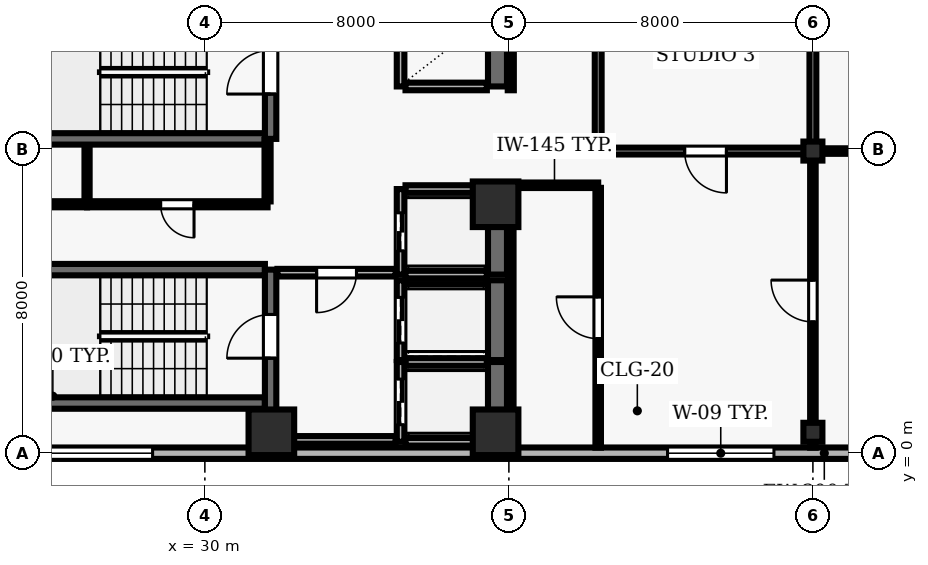
"""IFC4 building model, lengths in metres.
Left out: names, types, materials, properties, quantities, classifications, styles, units other than length and angle.
Written with IfcOpenShell. Run it as: python <this file> out.ifc"""

import sys

from ifc_helpers import new_model, si_unit, direction, frame, frame_2d, origin, origin_2d, place, context, subcontext, project, spatial, rectangle, hollow_rectangle, extrude, element, fill, save


model = new_model("IFC4")
c1 = context("Model", 3, precision=1e-05, world=origin(), true_north=direction((0.0, 1.0)))
c2 = subcontext(c1, "Body", "Model", "MODEL_VIEW")
j1 = project(units=[si_unit("LENGTHUNIT", "METRE"), si_unit("PLANEANGLEUNIT", "RADIAN")], contexts=[c1])
p1 = place(None, origin())
s1 = spatial("IfcSite", under=j1, at=p1, CompositionType="ELEMENT")
p2 = place(p1, origin())
s2 = spatial("IfcBuilding", under=s1, at=p2, CompositionType="ELEMENT")
p3 = place(p2, frame((0.0, 0.0, 134.6)))
s3 = spatial("IfcBuildingStorey", under=s2, at=p3, CompositionType="ELEMENT", Elevation=134.6)
for number, where, z_axis, x_axis in (
    (1, (31.75, 0.55, 0.0), (0.0, 0.0, 1.0), (1.0, 0.0, 0.0)),
    (2, (37.65, 0.55, 0.0), (0.0, 0.0, 1.0), (1.0, 0.0, 0.0)),
    (3, (37.65, 6.55, 0.0), (0.0, 0.0, 1.0), (1.0, 0.0, 0.0)),
):
    element("IfcColumn", number, at=place(p3, frame(where, z_axis=z_axis, x_axis=x_axis)), inside=s3, PredefinedType="COLUMN", context=c2, shape_type="SweptSolid", body=[
        extrude(rectangle(XDim=1.2, YDim=1.2, at=origin_2d()), origin(), (0.0, 0.0, 1.0), 3.9),
    ])
for number, where, z_axis, x_axis in (
    (4, (46.0, 0.55, 0.0), (0.0, 0.0, 1.0), (1.0, 0.0, 0.0)),
    (5, (46.0, 7.95, 0.0), (0.0, 0.0, 1.0), (1.0, 0.0, 0.0)),
):
    element("IfcColumn", number, at=place(p3, frame(where, z_axis=z_axis, x_axis=x_axis)), inside=s3, PredefinedType="COLUMN", context=c2, shape_type="SweptSolid", body=[
        extrude(hollow_rectangle(XDim=0.5, YDim=0.5, WallThickness=0.025, at=origin_2d()), origin(), (0.0, 0.0, 1.0), 3.9),
    ])
p4 = place(p3, frame((24.5, 0.0, 0.0), z_axis=(0.0, 0.0, 1.0), x_axis=(1.0, 0.0, 0.0)))
e6 = element("IfcWall", 6, at=p4, inside=s3, PredefinedType="SOLIDWALL", context=c2, shape_type="SweptSolid", body=[
    extrude(rectangle(XDim=43.6, YDim=0.3, at=frame_2d((21.8, 0.0))), origin(), (0.0, 0.0, 1.0), 3.69),
])
p5 = place(p4, frame((1.325, 0.0, 0.9)))
e7 = element("IfcOpeningElement", 7, at=p5, cuts=e6, PredefinedType="OPENING", context=c2, shape_type="SweptSolid", body=[
    extrude(rectangle(XDim=2.8, YDim=1.8, at=frame_2d((1.4, 0.9))), frame((0.0, 0.16, 0.0), z_axis=(0.0, -1.0, 0.0), x_axis=(1.0, 0.0, 0.0)), (0.0, 0.0, 1.0), 0.32),
])
p6 = place(p4, frame((17.675, 0.0, 0.9)))
e8 = element("IfcOpeningElement", 8, at=p6, cuts=e6, PredefinedType="OPENING", context=c2, shape_type="SweptSolid", body=[
    extrude(rectangle(XDim=2.8, YDim=1.8, at=frame_2d((1.4, 0.9))), frame((0.0, 0.16, 0.0), z_axis=(0.0, -1.0, 0.0), x_axis=(1.0, 0.0, 0.0)), (0.0, 0.0, 1.0), 0.32),
])
p7 = place(p4, frame((23.125, 0.0, 0.9)))
e9 = element("IfcOpeningElement", 9, at=p7, cuts=e6, PredefinedType="OPENING", context=c2, shape_type="SweptSolid", body=[
    extrude(rectangle(XDim=2.8, YDim=1.8, at=frame_2d((1.4, 0.9))), frame((0.0, 0.16, 0.0), z_axis=(0.0, -1.0, 0.0), x_axis=(1.0, 0.0, 0.0)), (0.0, 0.0, 1.0), 0.32),
])
p8 = place(p4, frame((29.475, 0.0, 0.9)))
e10 = element("IfcOpeningElement", 10, at=p8, cuts=e6, PredefinedType="OPENING", context=c2, shape_type="SweptSolid", body=[
    extrude(rectangle(XDim=2.8, YDim=1.8, at=frame_2d((1.4, 0.9))), frame((0.0, 0.16, 0.0), z_axis=(0.0, -1.0, 0.0), x_axis=(1.0, 0.0, 0.0)), (0.0, 0.0, 1.0), 0.32),
])
for number, where, z_axis, x_axis in (
    (11, (31.58, 4.83, 0.0), (0.0, 0.0, 1.0), (-1.0, 0.0, 0.0)),
    (12, (23.22, 1.32, 0.0), (0.0, 0.0, 1.0), (1.0, 0.0, 0.0)),
):
    element("IfcWall", number, at=place(p3, frame(where, z_axis=z_axis, x_axis=x_axis)), inside=s3, PredefinedType="SHEAR", context=c2, shape_type="SweptSolid", body=[
        extrude(rectangle(XDim=8.36, YDim=0.3, at=frame_2d((4.18, 0.0))), origin(), (0.0, 0.0, 1.0), 3.69),
    ])
p9 = place(p3, frame((31.73, 0.96, 0.0), z_axis=(0.0, 0.0, 1.0), x_axis=(0.0, 1.0, 0.0)))
e13 = element("IfcWall", 13, at=p9, inside=s3, PredefinedType="SHEAR", context=c2, shape_type="SweptSolid", body=[
    extrude(rectangle(XDim=3.87, YDim=0.3, at=frame_2d((1.935, 0.0))), origin(), (0.0, 0.0, 1.0), 3.69),
])
p10 = place(p9, frame((1.54, 0.0, 0.0)))
e14 = element("IfcOpeningElement", 14, at=p10, cuts=e13, PredefinedType="OPENING", context=c2, shape_type="SweptSolid", body=[
    extrude(rectangle(XDim=1.15, YDim=2.15, at=frame_2d((0.575, 1.075))), frame((0.0, 0.16, 0.0), z_axis=(0.0, -1.0, 0.0), x_axis=(1.0, 0.0, 0.0)), (0.0, 0.0, 1.0), 0.32),
])
p11 = place(p3, frame((23.22, 8.27, 0.0), z_axis=(0.0, 0.0, 1.0), x_axis=(1.0, 0.0, 0.0)))
e15 = element("IfcWall", 15, at=p11, inside=s3, PredefinedType="SHEAR", context=c2, shape_type="SweptSolid", body=[
    extrude(rectangle(XDim=8.36, YDim=0.3, at=frame_2d((4.18, 0.0))), origin(), (0.0, 0.0, 1.0), 3.69),
])
p12 = place(p3, frame((31.73, 8.27, 0.0), z_axis=(0.0, 0.0, 1.0), x_axis=(0.0, 1.0, 0.0)))
e16 = element("IfcWall", 16, at=p12, inside=s3, PredefinedType="SHEAR", context=c2, shape_type="SweptSolid", body=[
    extrude(rectangle(XDim=3.51, YDim=0.3, at=frame_2d((1.755, 0.0))), origin(), (0.0, 0.0, 1.0), 3.69),
])
p13 = place(p12, frame((1.18, 0.0, 0.0)))
e17 = element("IfcOpeningElement", 17, at=p13, cuts=e16, PredefinedType="OPENING", context=c2, shape_type="SweptSolid", body=[
    extrude(rectangle(XDim=1.15, YDim=2.15, at=frame_2d((0.575, 1.075))), frame((0.0, 0.16, 0.0), z_axis=(0.0, -1.0, 0.0), x_axis=(1.0, 0.0, 0.0)), (0.0, 0.0, 1.0), 0.32),
])
p14 = place(p3, frame((35.15, 2.4, 0.0), z_axis=(0.0, 0.0, 1.0), x_axis=(0.0, -1.0, 0.0)))
e18 = element("IfcWall", 18, at=p14, inside=s3, PredefinedType="SOLIDWALL", context=c2, shape_type="SweptSolid", body=[
    extrude(rectangle(XDim=2.1, YDim=0.2, at=frame_2d((1.05, 0.0))), origin(), (0.0, 0.0, 1.0), 3.69),
])
p15 = place(p14, frame((0.45, 0.0, 0.0)))
e19 = element("IfcOpeningElement", 19, at=p15, cuts=e18, PredefinedType="OPENING", context=c2, shape_type="SweptSolid", body=[
    extrude(rectangle(XDim=1.2, YDim=2.15, at=frame_2d((0.6, 1.075))), frame((0.0, 0.11, 0.0), z_axis=(0.0, -1.0, 0.0), x_axis=(1.0, 0.0, 0.0)), (0.0, 0.0, 1.0), 0.22),
])
p16 = place(p3, frame((37.7, 0.3, 0.0), z_axis=(0.0, 0.0, 1.0), x_axis=(0.0, 1.0, 0.0)))
e20 = element("IfcWall", 20, at=p16, inside=s3, PredefinedType="SHEAR", context=c2, shape_type="SweptSolid", body=[
    extrude(rectangle(XDim=2.1, YDim=0.5, at=frame_2d((1.05, 0.0))), origin(), (0.0, 0.0, 1.0), 3.69),
])
for number, where, z_axis, x_axis in (
    (21, (35.28, 0.3, 0.0), (0.0, 0.0, 1.0), (1.0, 0.0, 0.0)),
    (22, (37.42, 2.4, 0.0), (0.0, 0.0, 1.0), (-1.0, 0.0, 0.0)),
):
    element("IfcWall", number, at=place(p3, frame(where, z_axis=z_axis, x_axis=x_axis)), inside=s3, PredefinedType="SOLIDWALL", context=c2, shape_type="SweptSolid", body=[
        extrude(rectangle(XDim=2.14, YDim=0.2, at=frame_2d((1.07, 0.0))), origin(), (0.0, 0.0, 1.0), 3.69),
    ])
p17 = place(p3, frame((35.15, 4.55, 0.0), z_axis=(0.0, 0.0, 1.0), x_axis=(0.0, -1.0, 0.0)))
e23 = element("IfcWall", 23, at=p17, inside=s3, PredefinedType="SOLIDWALL", context=c2, shape_type="SweptSolid", body=[
    extrude(rectangle(XDim=2.1, YDim=0.2, at=frame_2d((1.05, 0.0))), origin(), (0.0, 0.0, 1.0), 3.69),
])
p18 = place(p17, frame((0.45, 0.0, 0.0)))
e24 = element("IfcOpeningElement", 24, at=p18, cuts=e23, PredefinedType="OPENING", context=c2, shape_type="SweptSolid", body=[
    extrude(rectangle(XDim=1.2, YDim=2.15, at=frame_2d((0.6, 1.075))), frame((0.0, 0.11, 0.0), z_axis=(0.0, -1.0, 0.0), x_axis=(1.0, 0.0, 0.0)), (0.0, 0.0, 1.0), 0.22),
])
p19 = place(p3, frame((37.7, 2.45, 0.0), z_axis=(0.0, 0.0, 1.0), x_axis=(0.0, 1.0, 0.0)))
e25 = element("IfcWall", 25, at=p19, inside=s3, PredefinedType="SHEAR", context=c2, shape_type="SweptSolid", body=[
    extrude(rectangle(XDim=2.1, YDim=0.5, at=frame_2d((1.05, 0.0))), origin(), (0.0, 0.0, 1.0), 3.69),
])
p20 = place(p3, frame((37.42, 4.55, 0.0), z_axis=(0.0, 0.0, 1.0), x_axis=(-1.0, 0.0, 0.0)))
e26 = element("IfcWall", 26, at=p20, inside=s3, PredefinedType="SOLIDWALL", context=c2, shape_type="SweptSolid", body=[
    extrude(rectangle(XDim=2.14, YDim=0.2, at=frame_2d((1.07, 0.0))), origin(), (0.0, 0.0, 1.0), 3.69),
])
p21 = place(p3, frame((35.15, 6.95, 0.0), z_axis=(0.0, 0.0, 1.0), x_axis=(0.0, -1.0, 0.0)))
e27 = element("IfcWall", 27, at=p21, inside=s3, PredefinedType="SOLIDWALL", context=c2, shape_type="SweptSolid", body=[
    extrude(rectangle(XDim=2.25, YDim=0.2, at=frame_2d((1.125, 0.0))), origin(), (0.0, 0.0, 1.0), 3.69),
])
p22 = place(p21, frame((0.625, 0.0, 0.0)))
e28 = element("IfcOpeningElement", 28, at=p22, cuts=e27, PredefinedType="OPENING", context=c2, shape_type="SweptSolid", body=[
    extrude(rectangle(XDim=1.0, YDim=2.1, at=frame_2d((0.5, 1.05))), frame((0.0, 0.11, 0.0), z_axis=(0.0, -1.0, 0.0), x_axis=(1.0, 0.0, 0.0)), (0.0, 0.0, 1.0), 0.22),
])
p23 = place(p3, frame((37.7, 4.7, 0.0), z_axis=(0.0, 0.0, 1.0), x_axis=(0.0, 1.0, 0.0)))
e29 = element("IfcWall", 29, at=p23, inside=s3, PredefinedType="SHEAR", context=c2, shape_type="SweptSolid", body=[
    extrude(rectangle(XDim=2.25, YDim=0.5, at=frame_2d((1.125, 0.0))), origin(), (0.0, 0.0, 1.0), 3.69),
])
for number, where, z_axis, x_axis in (
    (30, (35.28, 4.7, 0.0), (0.0, 0.0, 1.0), (1.0, 0.0, 0.0)),
    (31, (37.42, 6.95, 0.0), (0.0, 0.0, 1.0), (-1.0, 0.0, 0.0)),
):
    element("IfcWall", number, at=place(p3, frame(where, z_axis=z_axis, x_axis=x_axis)), inside=s3, PredefinedType="SOLIDWALL", context=c2, shape_type="SweptSolid", body=[
        extrude(rectangle(XDim=2.14, YDim=0.2, at=frame_2d((1.07, 0.0))), origin(), (0.0, 0.0, 1.0), 3.69),
    ])
p24 = place(p3, frame((35.15, 11.55, 0.0), z_axis=(0.0, 0.0, 1.0), x_axis=(0.0, -1.0, 0.0)))
e32 = element("IfcWall", 32, at=p24, inside=s3, PredefinedType="SOLIDWALL", context=c2, shape_type="SweptSolid", body=[
    extrude(rectangle(XDim=1.9, YDim=0.2, at=frame_2d((0.95, 0.0))), origin(), (0.0, 0.0, 1.0), 3.69),
])
p25 = place(p3, frame((37.7, 9.65, 0.0), z_axis=(0.0, 0.0, 1.0), x_axis=(0.0, 1.0, 0.0)))
e33 = element("IfcWall", 33, at=p25, inside=s3, PredefinedType="SHEAR", context=c2, shape_type="SweptSolid", body=[
    extrude(rectangle(XDim=1.9, YDim=0.5, at=frame_2d((0.95, 0.0))), origin(), (0.0, 0.0, 1.0), 3.69),
])
p26 = place(p3, frame((35.28, 9.65, 0.0), z_axis=(0.0, 0.0, 1.0), x_axis=(1.0, 0.0, 0.0)))
e34 = element("IfcWall", 34, at=p26, inside=s3, PredefinedType="SOLIDWALL", context=c2, shape_type="SweptSolid", body=[
    extrude(rectangle(XDim=2.14, YDim=0.2, at=frame_2d((1.07, 0.0))), origin(), (0.0, 0.0, 1.0), 3.69),
])
p27 = place(p3, frame((26.9, 6.55, 0.0), z_axis=(0.0, 0.0, 1.0), x_axis=(-1.0, 0.0, 0.0)))
e35 = element("IfcWall", 35, at=p27, inside=s3, PredefinedType="PARTITIONING", context=c2, shape_type="SweptSolid", body=[
    extrude(rectangle(XDim=4.7, YDim=0.16, at=frame_2d((2.35, 0.0))), origin(), (0.0, 0.0, 1.0), 3.69),
])
p28 = place(p27, frame((1.91, 0.0, 0.0)))
e36 = element("IfcOpeningElement", 36, at=p28, cuts=e35, PredefinedType="OPENING", context=c2, shape_type="SweptSolid", body=[
    extrude(rectangle(XDim=0.88, YDim=2.1, at=frame_2d((0.44, 1.05))), frame((0.0, 0.09, 0.0), z_axis=(0.0, -1.0, 0.0), x_axis=(1.0, 0.0, 0.0)), (0.0, 0.0, 1.0), 0.18),
])
p29 = place(p3, frame((31.65, 0.35, 0.0), z_axis=(0.0, 0.0, 1.0), x_axis=(1.0, 0.0, 0.0)))
e37 = element("IfcWall", 37, at=p29, inside=s3, PredefinedType="SOLIDWALL", context=c2, shape_type="SweptSolid", body=[
    extrude(rectangle(XDim=3.37, YDim=0.2, at=frame_2d((1.685, 0.0))), origin(), (0.0, 0.0, 1.0), 3.69),
])
p30 = place(p3, frame((31.65, 6.55, 0.0), z_axis=(0.0, 0.0, 1.0), x_axis=(-1.0, 0.0, 0.0)))
e38 = element("IfcWall", 38, at=p30, inside=s3, PredefinedType="PARTITIONING", context=c2, shape_type="SweptSolid", body=[
    extrude(rectangle(XDim=4.75, YDim=0.16, at=frame_2d((2.375, 0.0))), origin(), (0.0, 0.0, 1.0), 3.69),
])
p31 = place(p30, frame((1.935, 0.0, 0.0)))
e39 = element("IfcOpeningElement", 39, at=p31, cuts=e38, PredefinedType="OPENING", context=c2, shape_type="SweptSolid", body=[
    extrude(rectangle(XDim=0.88, YDim=2.1, at=frame_2d((0.44, 1.05))), frame((0.0, 0.09, 0.0), z_axis=(0.0, -1.0, 0.0), x_axis=(1.0, 0.0, 0.0)), (0.0, 0.0, 1.0), 0.18),
])
p32 = place(p3, frame((35.02, 4.75, 0.0), z_axis=(0.0, 0.0, 1.0), x_axis=(-1.0, 0.0, 0.0)))
e40 = element("IfcWall", 40, at=p32, inside=s3, PredefinedType="SOLIDWALL", context=c2, shape_type="SweptSolid", body=[
    extrude(rectangle(XDim=3.11, YDim=0.2, at=frame_2d((1.555, 0.0))), origin(), (0.0, 0.0, 1.0), 3.69),
])
p33 = place(p32, frame((1.03, 0.0, 0.0)))
e41 = element("IfcOpeningElement", 41, at=p33, cuts=e40, PredefinedType="OPENING", context=c2, shape_type="SweptSolid", body=[
    extrude(rectangle(XDim=1.05, YDim=2.15, at=frame_2d((0.525, 1.075))), frame((0.0, 0.11, 0.0), z_axis=(0.0, -1.0, 0.0), x_axis=(1.0, 0.0, 0.0)), (0.0, 0.0, 1.0), 0.22),
])
p34 = place(p3, frame((38.05, 7.05, 0.0), z_axis=(0.0, 0.0, 1.0), x_axis=(1.0, 0.0, 0.0)))
e42 = element("IfcWall", 42, at=p34, inside=s3, PredefinedType="PARTITIONING", context=c2, shape_type="SweptSolid", body=[
    extrude(rectangle(XDim=2.3, YDim=0.145, at=frame_2d((1.15, 0.0))), origin(), (0.0, 0.0, 1.0), 3.69),
])
p35 = place(p3, frame((46.0, 7.95, 0.0), z_axis=(0.0, 0.0, 1.0), x_axis=(-1.0, 0.0, 0.0)))
e43 = element("IfcWall", 43, at=p35, inside=s3, PredefinedType="PARTITIONING", context=c2, shape_type="SweptSolid", body=[
    extrude(rectangle(XDim=5.65, YDim=0.18, at=frame_2d((2.825, 0.0))), origin(), (0.0, 0.0, 1.0), 3.074),
])
p36 = place(p35, frame((2.275, 0.0, 0.0)))
e44 = element("IfcOpeningElement", 44, at=p36, cuts=e43, PredefinedType="OPENING", context=c2, shape_type="SweptSolid", body=[
    extrude(rectangle(XDim=1.1, YDim=2.15, at=frame_2d((0.55, 1.075))), frame((0.0, 0.1, 0.0), z_axis=(0.0, -1.0, 0.0), x_axis=(1.0, 0.0, 0.0)), (0.0, 0.0, 1.0), 0.2),
])
p37 = place(p3, frame((53.05, 7.95, 0.0), z_axis=(0.0, 0.0, 1.0), x_axis=(-1.0, 0.0, 0.0)))
e45 = element("IfcWall", 45, at=p37, inside=s3, PredefinedType="PARTITIONING", context=c2, shape_type="SweptSolid", body=[
    extrude(rectangle(XDim=7.05, YDim=0.145, at=frame_2d((3.525, 0.0))), origin(), (0.0, 0.0, 1.0), 3.074),
])
p38 = place(p3, frame((26.9, 6.625, 0.0), z_axis=(0.0, 0.0, 1.0), x_axis=(0.0, 1.0, 0.0)))
e46 = element("IfcWall", 46, at=p38, inside=s3, PredefinedType="PARTITIONING", context=c2, shape_type="SweptSolid", body=[
    extrude(rectangle(XDim=1.465, YDim=0.135, at=frame_2d((0.732, 0.0))), origin(), (0.0, 0.0, 1.0), 3.69),
])
p39 = place(p3, frame((31.65, 8.24, 0.0), z_axis=(0.0, 0.0, 1.0), x_axis=(0.0, -1.0, 0.0)))
e47 = element("IfcWall", 47, at=p39, inside=s3, PredefinedType="PARTITIONING", context=c2, shape_type="SweptSolid", body=[
    extrude(rectangle(XDim=1.615, YDim=0.16, at=frame_2d((0.808, 0.0))), origin(), (0.0, 0.0, 1.0), 3.69),
])
p40 = place(p3, frame((38.05, 6.982, 0.0), z_axis=(0.0, 0.0, 1.0), x_axis=(0.0, -1.0, 0.0)))
e48 = element("IfcWall", 48, at=p40, inside=s3, PredefinedType="PARTITIONING", context=c2, shape_type="SweptSolid", body=[
    extrude(rectangle(XDim=6.837, YDim=0.145, at=frame_2d((3.418, 0.0))), origin(), (0.0, 0.0, 1.0), 3.074),
])
p41 = place(p3, frame((38.05, 15.925, 0.0), z_axis=(0.0, 0.0, 1.0), x_axis=(0.0, -1.0, 0.0)))
e49 = element("IfcWall", 49, at=p41, inside=s3, PredefinedType="PARTITIONING", context=c2, shape_type="SweptSolid", body=[
    extrude(rectangle(XDim=6.375, YDim=0.16, at=frame_2d((3.188, 0.0))), origin(), (0.0, 0.0, 1.0), 3.074),
])
p42 = place(p3, frame((40.35, 0.145, 0.0), z_axis=(0.0, 0.0, 1.0), x_axis=(0.0, 1.0, 0.0)))
e50 = element("IfcWall", 50, at=p42, inside=s3, PredefinedType="PARTITIONING", context=c2, shape_type="SweptSolid", body=[
    extrude(rectangle(XDim=6.837, YDim=0.145, at=frame_2d((3.418, 0.0))), origin(), (0.0, 0.0, 1.0), 3.69),
])
p43 = place(p42, frame((2.869, 0.0, 0.0)))
e51 = element("IfcOpeningElement", 51, at=p43, cuts=e50, PredefinedType="OPENING", context=c2, shape_type="SweptSolid", body=[
    extrude(rectangle(XDim=1.1, YDim=2.15, at=frame_2d((0.55, 1.075))), frame((0.0, 0.083, 0.0), z_axis=(0.0, -1.0, 0.0), x_axis=(1.0, 0.0, 0.0)), (0.0, 0.0, 1.0), 0.165),
])
p44 = place(p3, frame((40.35, 8.035, 0.0), z_axis=(0.0, 0.0, 1.0), x_axis=(0.0, 1.0, 0.0)))
e52 = element("IfcWall", 52, at=p44, inside=s3, PredefinedType="PARTITIONING", context=c2, shape_type="SweptSolid", body=[
    extrude(rectangle(XDim=5.53, YDim=0.18, at=frame_2d((2.765, 0.0))), origin(), (0.0, 0.0, 1.0), 3.69),
])
p45 = place(p3, frame((46.0, 0.145, 0.0), z_axis=(0.0, 0.0, 1.0), x_axis=(0.0, 1.0, 0.0)))
e53 = element("IfcWall", 53, at=p45, inside=s3, PredefinedType="PARTITIONING", context=c2, shape_type="SweptSolid", body=[
    extrude(rectangle(XDim=7.72, YDim=0.145, at=frame_2d((3.86, 0.0))), origin(), (0.0, 0.0, 1.0), 3.074),
])
p46 = place(p45, frame((3.31, 0.0, 0.0)))
e54 = element("IfcOpeningElement", 54, at=p46, cuts=e53, PredefinedType="OPENING", context=c2, shape_type="SweptSolid", body=[
    extrude(rectangle(XDim=1.1, YDim=2.15, at=frame_2d((0.55, 1.075))), frame((0.0, 0.083, 0.0), z_axis=(0.0, -1.0, 0.0), x_axis=(1.0, 0.0, 0.0)), (0.0, 0.0, 1.0), 0.165),
])
p47 = place(p3, frame((46.0, 8.035, 0.0), z_axis=(0.0, 0.0, 1.0), x_axis=(0.0, 1.0, 0.0)))
e55 = element("IfcWall", 55, at=p47, inside=s3, PredefinedType="PARTITIONING", context=c2, shape_type="SweptSolid", body=[
    extrude(rectangle(XDim=5.53, YDim=0.18, at=frame_2d((2.765, 0.0))), origin(), (0.0, 0.0, 1.0), 3.074),
])
p48 = place(p5, origin())
e56 = element("IfcWindow", 56, at=p48, inside=s3, PartitioningType="SINGLE_PANEL", PredefinedType="WINDOW", context=c2, shape_type="SweptSolid", body=[
    extrude(rectangle(XDim=2.8, YDim=1.8, at=frame_2d((1.4, 0.9))), frame((0.0, 0.03, 0.0), z_axis=(0.0, -1.0, 0.0), x_axis=(1.0, 0.0, 0.0)), (0.0, 0.0, 1.0), 0.06),
])
fill(e7, e56)
p49 = place(p6, origin())
e57 = element("IfcWindow", 57, at=p49, inside=s3, PartitioningType="SINGLE_PANEL", PredefinedType="WINDOW", context=c2, shape_type="SweptSolid", body=[
    extrude(rectangle(XDim=2.8, YDim=1.8, at=frame_2d((1.4, 0.9))), frame((0.0, 0.03, 0.0), z_axis=(0.0, -1.0, 0.0), x_axis=(1.0, 0.0, 0.0)), (0.0, 0.0, 1.0), 0.06),
])
fill(e8, e57)
p50 = place(p10, origin())
e58 = element("IfcDoor", 58, at=p50, inside=s3, OperationType="SINGLE_SWING_LEFT", PredefinedType="DOOR", context=c2, shape_type="SweptSolid", body=[
    extrude(rectangle(XDim=1.15, YDim=2.15, at=frame_2d((0.575, 1.075))), frame((0.0, 0.025, 0.0), z_axis=(0.0, -1.0, 0.0), x_axis=(1.0, 0.0, 0.0)), (0.0, 0.0, 1.0), 0.05),
])
fill(e14, e58)
p51 = place(p13, origin())
e59 = element("IfcDoor", 59, at=p51, inside=s3, OperationType="SINGLE_SWING_LEFT", PredefinedType="DOOR", context=c2, shape_type="SweptSolid", body=[
    extrude(rectangle(XDim=1.15, YDim=2.15, at=frame_2d((0.575, 1.075))), frame((0.0, 0.025, 0.0), z_axis=(0.0, -1.0, 0.0), x_axis=(1.0, 0.0, 0.0)), (0.0, 0.0, 1.0), 0.05),
])
fill(e17, e59)
p52 = place(p15, origin())
e60 = element("IfcDoor", 60, at=p52, inside=s3, OperationType="DOUBLE_DOOR_SLIDING", PredefinedType="DOOR", context=c2, shape_type="SweptSolid", body=[
    extrude(rectangle(XDim=1.2, YDim=2.15, at=frame_2d((0.6, 1.075))), frame((0.0, 0.025, 0.0), z_axis=(0.0, -1.0, 0.0), x_axis=(1.0, 0.0, 0.0)), (0.0, 0.0, 1.0), 0.05),
])
fill(e19, e60)
p53 = place(p18, origin())
e61 = element("IfcDoor", 61, at=p53, inside=s3, OperationType="DOUBLE_DOOR_SLIDING", PredefinedType="DOOR", context=c2, shape_type="SweptSolid", body=[
    extrude(rectangle(XDim=1.2, YDim=2.15, at=frame_2d((0.6, 1.075))), frame((0.0, 0.025, 0.0), z_axis=(0.0, -1.0, 0.0), x_axis=(1.0, 0.0, 0.0)), (0.0, 0.0, 1.0), 0.05),
])
fill(e24, e61)
p54 = place(p22, origin())
e62 = element("IfcDoor", 62, at=p54, inside=s3, OperationType="DOUBLE_DOOR_SLIDING", PredefinedType="DOOR", context=c2, shape_type="SweptSolid", body=[
    extrude(rectangle(XDim=1.0, YDim=2.1, at=frame_2d((0.5, 1.05))), frame((0.0, 0.025, 0.0), z_axis=(0.0, -1.0, 0.0), x_axis=(1.0, 0.0, 0.0)), (0.0, 0.0, 1.0), 0.05),
])
fill(e28, e62)
p55 = place(p33, origin())
e63 = element("IfcDoor", 63, at=p55, inside=s3, OperationType="SINGLE_SWING_RIGHT", PredefinedType="DOOR", context=c2, shape_type="SweptSolid", body=[
    extrude(rectangle(XDim=1.05, YDim=2.15, at=frame_2d((0.525, 1.075))), frame((0.0, 0.025, 0.0), z_axis=(0.0, -1.0, 0.0), x_axis=(1.0, 0.0, 0.0)), (0.0, 0.0, 1.0), 0.05),
])
fill(e41, e63)
p56 = place(p31, origin())
e64 = element("IfcDoor", 64, at=p56, inside=s3, OperationType="SINGLE_SWING_LEFT", PredefinedType="DOOR", context=c2, shape_type="SweptSolid", body=[
    extrude(rectangle(XDim=0.88, YDim=2.1, at=frame_2d((0.44, 1.05))), frame((0.0, 0.025, 0.0), z_axis=(0.0, -1.0, 0.0), x_axis=(1.0, 0.0, 0.0)), (0.0, 0.0, 1.0), 0.05),
])
fill(e39, e64)
p57 = place(p36, origin())
e65 = element("IfcDoor", 65, at=p57, inside=s3, OperationType="SINGLE_SWING_LEFT", PredefinedType="DOOR", context=c2, shape_type="SweptSolid", body=[
    extrude(rectangle(XDim=1.1, YDim=2.15, at=frame_2d((0.55, 1.075))), frame((0.0, 0.025, 0.0), z_axis=(0.0, -1.0, 0.0), x_axis=(1.0, 0.0, 0.0)), (0.0, 0.0, 1.0), 0.05),
])
fill(e44, e65)
p58 = place(p46, origin())
e66 = element("IfcDoor", 66, at=p58, inside=s3, OperationType="SINGLE_SWING_RIGHT", PredefinedType="DOOR", context=c2, shape_type="SweptSolid", body=[
    extrude(rectangle(XDim=1.1, YDim=2.15, at=frame_2d((0.55, 1.075))), frame((0.0, 0.025, 0.0), z_axis=(0.0, -1.0, 0.0), x_axis=(1.0, 0.0, 0.0)), (0.0, 0.0, 1.0), 0.05),
])
fill(e54, e66)
p59 = place(p43, origin())
e67 = element("IfcDoor", 67, at=p59, inside=s3, OperationType="SINGLE_SWING_RIGHT", PredefinedType="DOOR", context=c2, shape_type="SweptSolid", body=[
    extrude(rectangle(XDim=1.1, YDim=2.15, at=frame_2d((0.55, 1.075))), frame((0.0, 0.025, 0.0), z_axis=(0.0, -1.0, 0.0), x_axis=(1.0, 0.0, 0.0)), (0.0, 0.0, 1.0), 0.05),
])
fill(e51, e67)
save(model, sys.argv[1])
